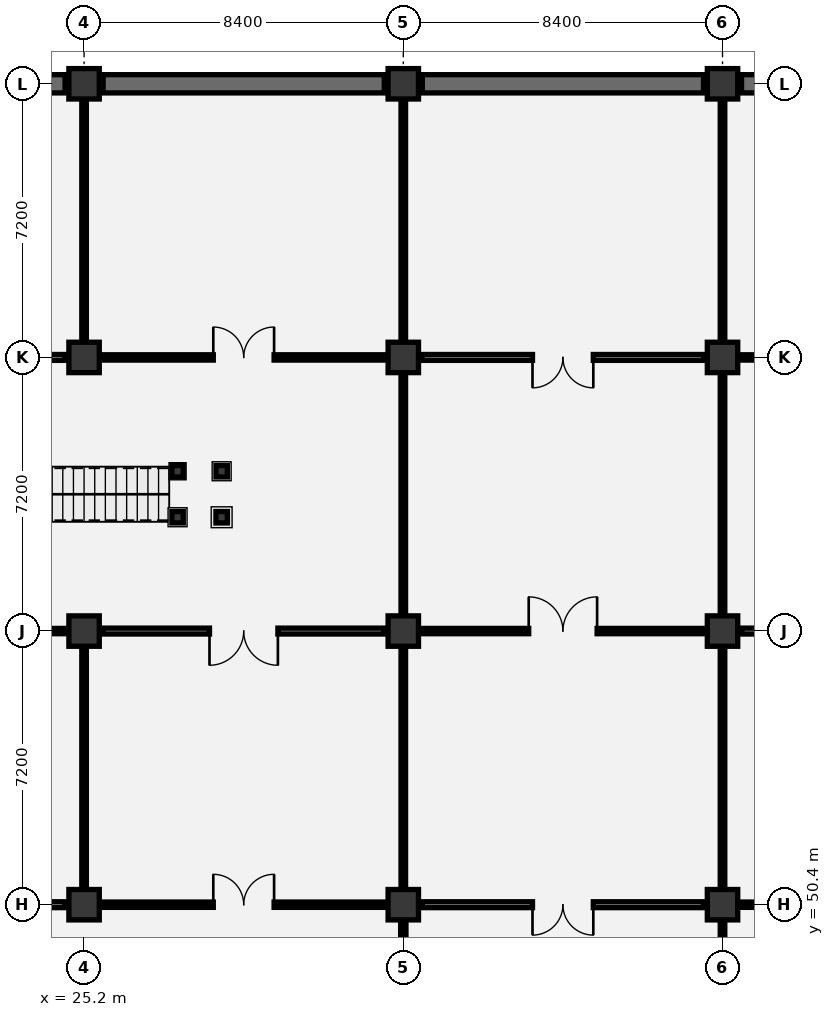
"""IFC4 building model, lengths in metres.
Left out: names, types, materials, properties, quantities, classifications, styles, units other than length and angle.
Written with IfcOpenShell. Run it as: python <this file> out.ifc"""

import sys

from ifc_helpers import new_model, si_unit, direction, frame, frame_2d, origin, origin_2d, place, context, subcontext, project, spatial, rectangle, i_section, extrude, element, fill, save


model = new_model("IFC4")
c1 = context("Model", 3, precision=1e-05, world=origin(), true_north=direction((0.0, 1.0)))
c2 = subcontext(c1, "Body", "Model", "MODEL_VIEW")
j1 = project(units=[si_unit("LENGTHUNIT", "METRE"), si_unit("PLANEANGLEUNIT", "RADIAN")], contexts=[c1])
p1 = place(None, origin())
s1 = spatial("IfcSite", under=j1, at=p1, CompositionType="ELEMENT")
p2 = place(p1, origin())
s2 = spatial("IfcBuilding", under=s1, at=p2, CompositionType="ELEMENT")
p3 = place(p2, frame((0.0, 0.0, -4.8)))
s3 = spatial("IfcBuildingStorey", under=s2, at=p3, CompositionType="ELEMENT", Elevation=-4.8)
for number, where, z_axis, x_axis in (
    (1, (25.2, 50.4, 0.0), (0.0, 0.0, 1.0), (1.0, 0.0, 0.0)),
    (2, (25.2, 57.6, 0.0), (0.0, 0.0, 1.0), (1.0, 0.0, 0.0)),
    (3, (25.2, 64.8, 0.0), (0.0, 0.0, 1.0), (1.0, 0.0, 0.0)),
    (4, (25.2, 72.0, 0.0), (0.0, 0.0, 1.0), (1.0, 0.0, 0.0)),
    (5, (33.6, 50.4, 0.0), (0.0, 0.0, 1.0), (1.0, 0.0, 0.0)),
    (6, (33.6, 57.6, 0.0), (0.0, 0.0, 1.0), (1.0, 0.0, 0.0)),
    (7, (33.6, 64.8, 0.0), (0.0, 0.0, 1.0), (1.0, 0.0, 0.0)),
    (8, (33.6, 72.0, 0.0), (0.0, 0.0, 1.0), (1.0, 0.0, 0.0)),
    (9, (42.0, 50.4, 0.0), (0.0, 0.0, 1.0), (1.0, 0.0, 0.0)),
    (10, (42.0, 57.6, 0.0), (0.0, 0.0, 1.0), (1.0, 0.0, 0.0)),
    (11, (42.0, 64.8, 0.0), (0.0, 0.0, 1.0), (1.0, 0.0, 0.0)),
    (12, (42.0, 72.0, 0.0), (0.0, 0.0, 1.0), (1.0, 0.0, 0.0)),
):
    element("IfcColumn", number, at=place(p3, frame(where, z_axis=z_axis, x_axis=x_axis)), inside=s3, PredefinedType="COLUMN", context=c2, shape_type="SweptSolid", body=[
        extrude(rectangle(XDim=0.8, YDim=0.8, at=origin_2d()), origin(), (0.0, 0.0, 1.0), 4.8),
    ])
for number, where, z_axis, x_axis in (
    (13, (27.66, 60.595, 0.0), (0.0, 0.0, 1.0), (1.0, 0.0, 0.0)),
    (14, (28.82, 60.595, 0.0), (0.0, 0.0, 1.0), (1.0, 0.0, 0.0)),
    (15, (27.66, 61.805, 0.0), (0.0, 0.0, 1.0), (1.0, 0.0, 0.0)),
    (16, (28.82, 61.805, 0.0), (0.0, 0.0, 1.0), (1.0, 0.0, 0.0)),
):
    element("IfcColumn", number, at=place(p3, frame(where, z_axis=z_axis, x_axis=x_axis)), inside=s3, PredefinedType="COLUMN", context=c2, shape_type="SweptSolid", body=[
        extrude(i_section(OverallWidth=0.3, OverallDepth=0.3, WebThickness=0.011, FlangeThickness=0.019, FilletRadius=0.027, at=origin_2d()), origin(), (0.0, 0.0, 1.0), 4.6),
    ])
p4 = place(p3, frame((17.3, 72.0, 0.0), z_axis=(0.0, 0.0, 1.0), x_axis=(1.0, 0.0, 0.0)))
e17 = element("IfcWall", 17, at=p4, inside=s3, PredefinedType="USERDEFINED", context=c2, shape_type="SweptSolid", body=[
    extrude(rectangle(XDim=7.4, YDim=0.48, at=frame_2d((3.7, 0.0))), origin(), (0.0, 0.0, 1.0), 4.45),
])
p5 = place(p3, frame((25.7, 72.0, 0.0), z_axis=(0.0, 0.0, 1.0), x_axis=(1.0, 0.0, 0.0)))
e18 = element("IfcWall", 18, at=p5, inside=s3, PredefinedType="USERDEFINED", context=c2, shape_type="SweptSolid", body=[
    extrude(rectangle(XDim=7.4, YDim=0.48, at=frame_2d((3.7, 0.0))), origin(), (0.0, 0.0, 1.0), 4.45),
])
for number, where, z_axis, x_axis in (
    (19, (34.1, 72.0, 0.0), (0.0, 0.0, 1.0), (1.0, 0.0, 0.0)),
    (20, (42.5, 72.0, 0.0), (0.0, 0.0, 1.0), (1.0, 0.0, 0.0)),
):
    element("IfcWall", number, at=place(p3, frame(where, z_axis=z_axis, x_axis=x_axis)), inside=s3, PredefinedType="USERDEFINED", context=c2, shape_type="SweptSolid", body=[
        extrude(rectangle(XDim=7.4, YDim=0.48, at=frame_2d((3.7, 0.0))), origin(), (0.0, 0.0, 1.0), 4.45),
    ])
p6 = place(p3, frame((17.3, 50.4, 0.0), z_axis=(0.0, 0.0, 1.0), x_axis=(1.0, 0.0, 0.0)))
e21 = element("IfcWall", 21, at=p6, inside=s3, PredefinedType="PARTITIONING", context=c2, shape_type="SweptSolid", body=[
    extrude(rectangle(XDim=7.4, YDim=0.155, at=frame_2d((3.7, 0.0))), origin(), (0.0, 0.0, 1.0), 3.545),
])
p7 = place(p6, frame((2.9, 0.0, 0.0)))
e22 = element("IfcOpeningElement", 22, at=p7, cuts=e21, PredefinedType="OPENING", context=c2, shape_type="SweptSolid", body=[
    extrude(rectangle(XDim=1.6, YDim=2.2, at=frame_2d((0.8, 1.1))), frame((0.0, 0.087, 0.0), z_axis=(0.0, -1.0, 0.0), x_axis=(1.0, 0.0, 0.0)), (0.0, 0.0, 1.0), 0.175),
])
p8 = place(p3, frame((25.2, 50.9, 0.0), z_axis=(0.0, 0.0, 1.0), x_axis=(0.0, 1.0, 0.0)))
e23 = element("IfcWall", 23, at=p8, inside=s3, PredefinedType="PARTITIONING", context=c2, shape_type="SweptSolid", body=[
    extrude(rectangle(XDim=6.2, YDim=0.12, at=frame_2d((3.1, 0.0))), origin(), (0.0, 0.0, 1.0), 3.645),
])
p9 = place(p3, frame((17.3, 57.6, 0.0), z_axis=(0.0, 0.0, 1.0), x_axis=(1.0, 0.0, 0.0)))
e24 = element("IfcWall", 24, at=p9, inside=s3, PredefinedType="PARTITIONING", context=c2, shape_type="SweptSolid", body=[
    extrude(rectangle(XDim=7.4, YDim=0.14, at=frame_2d((3.7, 0.0))), origin(), (0.0, 0.0, 1.0), 3.545),
])
p10 = place(p9, frame((2.8, 0.0, 0.0)))
e25 = element("IfcOpeningElement", 25, at=p10, cuts=e24, PredefinedType="OPENING", context=c2, shape_type="SweptSolid", body=[
    extrude(rectangle(XDim=1.8, YDim=2.25, at=frame_2d((0.9, 1.125))), frame((0.0, 0.08, 0.0), z_axis=(0.0, -1.0, 0.0), x_axis=(1.0, 0.0, 0.0)), (0.0, 0.0, 1.0), 0.16),
])
p11 = place(p3, frame((17.3, 64.8, 0.0), z_axis=(0.0, 0.0, 1.0), x_axis=(1.0, 0.0, 0.0)))
e26 = element("IfcWall", 26, at=p11, inside=s3, PredefinedType="PARTITIONING", context=c2, shape_type="SweptSolid", body=[
    extrude(rectangle(XDim=7.4, YDim=0.155, at=frame_2d((3.7, 0.0))), origin(), (0.0, 0.0, 1.0), 3.545),
])
p12 = place(p11, frame((2.9, 0.0, 0.0)))
e27 = element("IfcOpeningElement", 27, at=p12, cuts=e26, PredefinedType="OPENING", context=c2, shape_type="SweptSolid", body=[
    extrude(rectangle(XDim=1.6, YDim=2.2, at=frame_2d((0.8, 1.1))), frame((0.0, 0.087, 0.0), z_axis=(0.0, -1.0, 0.0), x_axis=(1.0, 0.0, 0.0)), (0.0, 0.0, 1.0), 0.175),
])
p13 = place(p3, frame((25.2, 65.3, 0.0), z_axis=(0.0, 0.0, 1.0), x_axis=(0.0, 1.0, 0.0)))
e28 = element("IfcWall", 28, at=p13, inside=s3, PredefinedType="PARTITIONING", context=c2, shape_type="SweptSolid", body=[
    extrude(rectangle(XDim=6.2, YDim=0.12, at=frame_2d((3.1, 0.0))), origin(), (0.0, 0.0, 1.0), 3.645),
])
p14 = place(p3, frame((33.6, 43.7, 0.0), z_axis=(0.0, 0.0, 1.0), x_axis=(0.0, 1.0, 0.0)))
e29 = element("IfcWall", 29, at=p14, inside=s3, PredefinedType="PARTITIONING", context=c2, shape_type="SweptSolid", body=[
    extrude(rectangle(XDim=6.2, YDim=0.14, at=frame_2d((3.1, 0.0))), origin(), (0.0, 0.0, 1.0), 3.645),
])
p15 = place(p14, frame((2.2, 0.0, 0.0)))
e30 = element("IfcOpeningElement", 30, at=p15, cuts=e29, PredefinedType="OPENING", context=c2, shape_type="SweptSolid", body=[
    extrude(rectangle(XDim=1.8, YDim=2.25, at=frame_2d((0.9, 1.125))), frame((0.0, 0.08, 0.0), z_axis=(0.0, -1.0, 0.0), x_axis=(1.0, 0.0, 0.0)), (0.0, 0.0, 1.0), 0.16),
])
p16 = place(p3, frame((25.7, 50.4, 0.0), z_axis=(0.0, 0.0, 1.0), x_axis=(1.0, 0.0, 0.0)))
e31 = element("IfcWall", 31, at=p16, inside=s3, PredefinedType="PARTITIONING", context=c2, shape_type="SweptSolid", body=[
    extrude(rectangle(XDim=7.4, YDim=0.14, at=frame_2d((3.7, 0.0))), origin(), (0.0, 0.0, 1.0), 3.545),
])
p17 = place(p16, frame((2.9, 0.0, 0.0)))
e32 = element("IfcOpeningElement", 32, at=p17, cuts=e31, PredefinedType="OPENING", context=c2, shape_type="SweptSolid", body=[
    extrude(rectangle(XDim=1.6, YDim=2.2, at=frame_2d((0.8, 1.1))), frame((0.0, 0.08, 0.0), z_axis=(0.0, -1.0, 0.0), x_axis=(1.0, 0.0, 0.0)), (0.0, 0.0, 1.0), 0.16),
])
p18 = place(p3, frame((33.6, 50.9, 0.0), z_axis=(0.0, 0.0, 1.0), x_axis=(0.0, 1.0, 0.0)))
e33 = element("IfcWall", 33, at=p18, inside=s3, PredefinedType="PARTITIONING", context=c2, shape_type="SweptSolid", body=[
    extrude(rectangle(XDim=6.2, YDim=0.12, at=frame_2d((3.1, 0.0))), origin(), (0.0, 0.0, 1.0), 3.645),
])
p19 = place(p3, frame((25.7, 57.6, 0.0), z_axis=(0.0, 0.0, 1.0), x_axis=(1.0, 0.0, 0.0)))
e34 = element("IfcWall", 34, at=p19, inside=s3, PredefinedType="PARTITIONING", context=c2, shape_type="SweptSolid", body=[
    extrude(rectangle(XDim=7.4, YDim=0.155, at=frame_2d((3.7, 0.0))), origin(), (0.0, 0.0, 1.0), 3.545),
])
p20 = place(p19, frame((2.8, 0.0, 0.0)))
e35 = element("IfcOpeningElement", 35, at=p20, cuts=e34, PredefinedType="OPENING", context=c2, shape_type="SweptSolid", body=[
    extrude(rectangle(XDim=1.8, YDim=2.25, at=frame_2d((0.9, 1.125))), frame((0.0, 0.087, 0.0), z_axis=(0.0, -1.0, 0.0), x_axis=(1.0, 0.0, 0.0)), (0.0, 0.0, 1.0), 0.175),
])
p21 = place(p3, frame((33.6, 58.1, 0.0), z_axis=(0.0, 0.0, 1.0), x_axis=(0.0, 1.0, 0.0)))
e36 = element("IfcWall", 36, at=p21, inside=s3, PredefinedType="PARTITIONING", context=c2, shape_type="SweptSolid", body=[
    extrude(rectangle(XDim=6.2, YDim=0.12, at=frame_2d((3.1, 0.0))), origin(), (0.0, 0.0, 1.0), 3.645),
])
p22 = place(p3, frame((25.7, 64.8, 0.0), z_axis=(0.0, 0.0, 1.0), x_axis=(1.0, 0.0, 0.0)))
e37 = element("IfcWall", 37, at=p22, inside=s3, PredefinedType="PARTITIONING", context=c2, shape_type="SweptSolid", body=[
    extrude(rectangle(XDim=7.4, YDim=0.14, at=frame_2d((3.7, 0.0))), origin(), (0.0, 0.0, 1.0), 3.545),
])
p23 = place(p22, frame((2.9, 0.0, 0.0)))
e38 = element("IfcOpeningElement", 38, at=p23, cuts=e37, PredefinedType="OPENING", context=c2, shape_type="SweptSolid", body=[
    extrude(rectangle(XDim=1.6, YDim=2.2, at=frame_2d((0.8, 1.1))), frame((0.0, 0.08, 0.0), z_axis=(0.0, -1.0, 0.0), x_axis=(1.0, 0.0, 0.0)), (0.0, 0.0, 1.0), 0.16),
])
for number, where, z_axis, x_axis in (
    (39, (33.6, 65.3, 0.0), (0.0, 0.0, 1.0), (0.0, 1.0, 0.0)),
    (40, (42.0, 43.7, 0.0), (0.0, 0.0, 1.0), (0.0, 1.0, 0.0)),
):
    element("IfcWall", number, at=place(p3, frame(where, z_axis=z_axis, x_axis=x_axis)), inside=s3, PredefinedType="PARTITIONING", context=c2, shape_type="SweptSolid", body=[
        extrude(rectangle(XDim=6.2, YDim=0.12, at=frame_2d((3.1, 0.0))), origin(), (0.0, 0.0, 1.0), 3.645),
    ])
p24 = place(p3, frame((34.1, 50.4, 0.0), z_axis=(0.0, 0.0, 1.0), x_axis=(1.0, 0.0, 0.0)))
e41 = element("IfcWall", 41, at=p24, inside=s3, PredefinedType="PARTITIONING", context=c2, shape_type="SweptSolid", body=[
    extrude(rectangle(XDim=7.4, YDim=0.155, at=frame_2d((3.7, 0.0))), origin(), (0.0, 0.0, 1.0), 3.545),
])
p25 = place(p24, frame((2.9, 0.0, 0.0)))
e42 = element("IfcOpeningElement", 42, at=p25, cuts=e41, PredefinedType="OPENING", context=c2, shape_type="SweptSolid", body=[
    extrude(rectangle(XDim=1.6, YDim=2.2, at=frame_2d((0.8, 1.1))), frame((0.0, 0.087, 0.0), z_axis=(0.0, -1.0, 0.0), x_axis=(1.0, 0.0, 0.0)), (0.0, 0.0, 1.0), 0.175),
])
p26 = place(p3, frame((42.0, 50.9, 0.0), z_axis=(0.0, 0.0, 1.0), x_axis=(0.0, 1.0, 0.0)))
e43 = element("IfcWall", 43, at=p26, inside=s3, PredefinedType="PARTITIONING", context=c2, shape_type="SweptSolid", body=[
    extrude(rectangle(XDim=6.2, YDim=0.12, at=frame_2d((3.1, 0.0))), origin(), (0.0, 0.0, 1.0), 3.645),
])
p27 = place(p3, frame((34.1, 57.6, 0.0), z_axis=(0.0, 0.0, 1.0), x_axis=(1.0, 0.0, 0.0)))
e44 = element("IfcWall", 44, at=p27, inside=s3, PredefinedType="PARTITIONING", context=c2, shape_type="SweptSolid", body=[
    extrude(rectangle(XDim=7.4, YDim=0.14, at=frame_2d((3.7, 0.0))), origin(), (0.0, 0.0, 1.0), 3.545),
])
p28 = place(p27, frame((2.8, 0.0, 0.0)))
e45 = element("IfcOpeningElement", 45, at=p28, cuts=e44, PredefinedType="OPENING", context=c2, shape_type="SweptSolid", body=[
    extrude(rectangle(XDim=1.8, YDim=2.25, at=frame_2d((0.9, 1.125))), frame((0.0, 0.08, 0.0), z_axis=(0.0, -1.0, 0.0), x_axis=(1.0, 0.0, 0.0)), (0.0, 0.0, 1.0), 0.16),
])
p29 = place(p3, frame((42.0, 58.1, 0.0), z_axis=(0.0, 0.0, 1.0), x_axis=(0.0, 1.0, 0.0)))
e46 = element("IfcWall", 46, at=p29, inside=s3, PredefinedType="PARTITIONING", context=c2, shape_type="SweptSolid", body=[
    extrude(rectangle(XDim=6.2, YDim=0.12, at=frame_2d((3.1, 0.0))), origin(), (0.0, 0.0, 1.0), 3.645),
])
p30 = place(p3, frame((34.1, 64.8, 0.0), z_axis=(0.0, 0.0, 1.0), x_axis=(1.0, 0.0, 0.0)))
e47 = element("IfcWall", 47, at=p30, inside=s3, PredefinedType="PARTITIONING", context=c2, shape_type="SweptSolid", body=[
    extrude(rectangle(XDim=7.4, YDim=0.155, at=frame_2d((3.7, 0.0))), origin(), (0.0, 0.0, 1.0), 3.545),
])
p31 = place(p30, frame((2.9, 0.0, 0.0)))
e48 = element("IfcOpeningElement", 48, at=p31, cuts=e47, PredefinedType="OPENING", context=c2, shape_type="SweptSolid", body=[
    extrude(rectangle(XDim=1.6, YDim=2.2, at=frame_2d((0.8, 1.1))), frame((0.0, 0.087, 0.0), z_axis=(0.0, -1.0, 0.0), x_axis=(1.0, 0.0, 0.0)), (0.0, 0.0, 1.0), 0.175),
])
p32 = place(p3, frame((42.0, 65.3, 0.0), z_axis=(0.0, 0.0, 1.0), x_axis=(0.0, 1.0, 0.0)))
e49 = element("IfcWall", 49, at=p32, inside=s3, PredefinedType="PARTITIONING", context=c2, shape_type="SweptSolid", body=[
    extrude(rectangle(XDim=6.2, YDim=0.12, at=frame_2d((3.1, 0.0))), origin(), (0.0, 0.0, 1.0), 3.645),
])
p33 = place(p3, frame((42.5, 50.4, 0.0), z_axis=(0.0, 0.0, 1.0), x_axis=(1.0, 0.0, 0.0)))
e50 = element("IfcWall", 50, at=p33, inside=s3, PredefinedType="PARTITIONING", context=c2, shape_type="SweptSolid", body=[
    extrude(rectangle(XDim=7.4, YDim=0.14, at=frame_2d((3.7, 0.0))), origin(), (0.0, 0.0, 1.0), 3.545),
])
p34 = place(p33, frame((2.9, 0.0, 0.0)))
e51 = element("IfcOpeningElement", 51, at=p34, cuts=e50, PredefinedType="OPENING", context=c2, shape_type="SweptSolid", body=[
    extrude(rectangle(XDim=1.6, YDim=2.2, at=frame_2d((0.8, 1.1))), frame((0.0, 0.08, 0.0), z_axis=(0.0, -1.0, 0.0), x_axis=(1.0, 0.0, 0.0)), (0.0, 0.0, 1.0), 0.16),
])
p35 = place(p3, frame((42.5, 57.6, 0.0), z_axis=(0.0, 0.0, 1.0), x_axis=(1.0, 0.0, 0.0)))
e52 = element("IfcWall", 52, at=p35, inside=s3, PredefinedType="PARTITIONING", context=c2, shape_type="SweptSolid", body=[
    extrude(rectangle(XDim=7.4, YDim=0.155, at=frame_2d((3.7, 0.0))), origin(), (0.0, 0.0, 1.0), 3.545),
])
p36 = place(p35, frame((2.8, 0.0, 0.0)))
e53 = element("IfcOpeningElement", 53, at=p36, cuts=e52, PredefinedType="OPENING", context=c2, shape_type="SweptSolid", body=[
    extrude(rectangle(XDim=1.8, YDim=2.25, at=frame_2d((0.9, 1.125))), frame((0.0, 0.087, 0.0), z_axis=(0.0, -1.0, 0.0), x_axis=(1.0, 0.0, 0.0)), (0.0, 0.0, 1.0), 0.175),
])
p37 = place(p3, frame((42.5, 64.8, 0.0), z_axis=(0.0, 0.0, 1.0), x_axis=(1.0, 0.0, 0.0)))
e54 = element("IfcWall", 54, at=p37, inside=s3, PredefinedType="PARTITIONING", context=c2, shape_type="SweptSolid", body=[
    extrude(rectangle(XDim=7.4, YDim=0.14, at=frame_2d((3.7, 0.0))), origin(), (0.0, 0.0, 1.0), 3.545),
])
p38 = place(p37, frame((2.9, 0.0, 0.0)))
e55 = element("IfcOpeningElement", 55, at=p38, cuts=e54, PredefinedType="OPENING", context=c2, shape_type="SweptSolid", body=[
    extrude(rectangle(XDim=1.6, YDim=2.2, at=frame_2d((0.8, 1.1))), frame((0.0, 0.08, 0.0), z_axis=(0.0, -1.0, 0.0), x_axis=(1.0, 0.0, 0.0)), (0.0, 0.0, 1.0), 0.16),
])
p39 = place(p17, origin())
e56 = element("IfcDoor", 56, at=p39, inside=s3, OperationType="DOUBLE_DOOR_SINGLE_SWING", PredefinedType="DOOR", context=c2, shape_type="SweptSolid", body=[
    extrude(rectangle(XDim=1.6, YDim=2.2, at=frame_2d((0.8, 1.1))), frame((0.0, 0.025, 0.0), z_axis=(0.0, -1.0, 0.0), x_axis=(1.0, 0.0, 0.0)), (0.0, 0.0, 1.0), 0.05),
])
fill(e32, e56)
p40 = place(p20, frame((1.8, 0.0, 0.0), z_axis=(0.0, 0.0, 1.0), x_axis=(-1.0, 0.0, 0.0)))
e57 = element("IfcDoor", 57, at=p40, inside=s3, OperationType="DOUBLE_DOOR_SINGLE_SWING", PredefinedType="DOOR", context=c2, shape_type="SweptSolid", body=[
    extrude(rectangle(XDim=1.8, YDim=2.25, at=frame_2d((0.9, 1.125))), frame((0.0, 0.025, 0.0), z_axis=(0.0, -1.0, 0.0), x_axis=(1.0, 0.0, 0.0)), (0.0, 0.0, 1.0), 0.05),
])
fill(e35, e57)
p41 = place(p23, origin())
e58 = element("IfcDoor", 58, at=p41, inside=s3, OperationType="DOUBLE_DOOR_SINGLE_SWING", PredefinedType="DOOR", context=c2, shape_type="SweptSolid", body=[
    extrude(rectangle(XDim=1.6, YDim=2.2, at=frame_2d((0.8, 1.1))), frame((0.0, 0.025, 0.0), z_axis=(0.0, -1.0, 0.0), x_axis=(1.0, 0.0, 0.0)), (0.0, 0.0, 1.0), 0.05),
])
fill(e38, e58)
p42 = place(p25, frame((1.6, 0.0, 0.0), z_axis=(0.0, 0.0, 1.0), x_axis=(-1.0, 0.0, 0.0)))
e59 = element("IfcDoor", 59, at=p42, inside=s3, OperationType="DOUBLE_DOOR_SINGLE_SWING", PredefinedType="DOOR", context=c2, shape_type="SweptSolid", body=[
    extrude(rectangle(XDim=1.6, YDim=2.2, at=frame_2d((0.8, 1.1))), frame((0.0, 0.025, 0.0), z_axis=(0.0, -1.0, 0.0), x_axis=(1.0, 0.0, 0.0)), (0.0, 0.0, 1.0), 0.05),
])
fill(e42, e59)
p43 = place(p28, origin())
e60 = element("IfcDoor", 60, at=p43, inside=s3, OperationType="DOUBLE_DOOR_SINGLE_SWING", PredefinedType="DOOR", context=c2, shape_type="SweptSolid", body=[
    extrude(rectangle(XDim=1.8, YDim=2.25, at=frame_2d((0.9, 1.125))), frame((0.0, 0.025, 0.0), z_axis=(0.0, -1.0, 0.0), x_axis=(1.0, 0.0, 0.0)), (0.0, 0.0, 1.0), 0.05),
])
fill(e45, e60)
p44 = place(p31, frame((1.6, 0.0, 0.0), z_axis=(0.0, 0.0, 1.0), x_axis=(-1.0, 0.0, 0.0)))
e61 = element("IfcDoor", 61, at=p44, inside=s3, OperationType="DOUBLE_DOOR_SINGLE_SWING", PredefinedType="DOOR", context=c2, shape_type="SweptSolid", body=[
    extrude(rectangle(XDim=1.6, YDim=2.2, at=frame_2d((0.8, 1.1))), frame((0.0, 0.025, 0.0), z_axis=(0.0, -1.0, 0.0), x_axis=(1.0, 0.0, 0.0)), (0.0, 0.0, 1.0), 0.05),
])
fill(e48, e61)
save(model, sys.argv[1])
